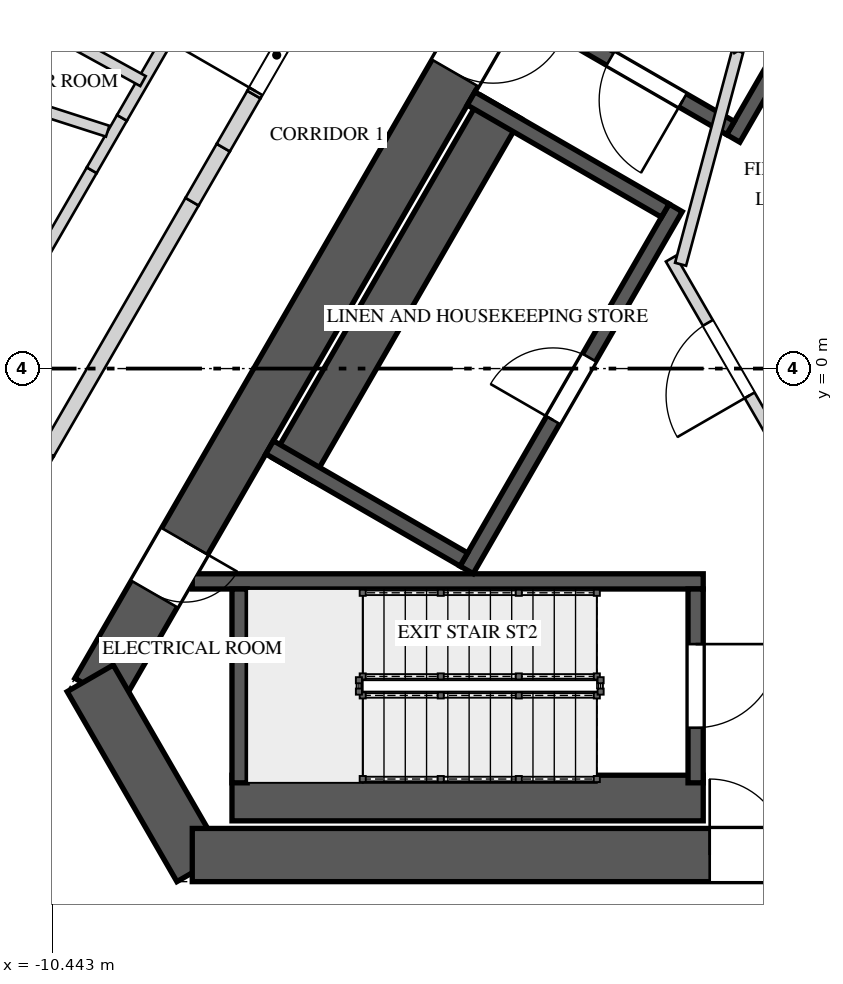
"""IFC4 building model, lengths in metres.
Left out: names, types, materials, properties, quantities, classifications, styles, units other than length and angle.
Written with IfcOpenShell. Run it as: python <this file> out.ifc"""

import sys

from ifc_helpers import new_model, si_unit, direction, frame, frame_2d, origin, place, context, subcontext, project, spatial, polyline, rectangle, outline, extrude, element, fill, save


model = new_model("IFC4")
c1 = context("Model", 3, precision=1e-05, world=origin(), true_north=direction((0.0, 1.0)))
c2 = subcontext(c1, "Body", "Model", "MODEL_VIEW")
j1 = project(units=[si_unit("LENGTHUNIT", "METRE"), si_unit("PLANEANGLEUNIT", "RADIAN")], contexts=[c1])
p1 = place(None, origin())
s1 = spatial("IfcSite", under=j1, at=p1, CompositionType="ELEMENT")
p2 = place(p1, origin())
s2 = spatial("IfcBuilding", under=s1, at=p2, CompositionType="ELEMENT")
p3 = place(p2, frame((0.0, 0.0, 245.2)))
s3 = spatial("IfcBuildingStorey", under=s2, at=p3, CompositionType="ELEMENT", Elevation=245.2)
p4 = place(p3, frame((-1.241, 10.65, 0.0), z_axis=(0.0, 0.0, 1.0), x_axis=(-0.500003331888, -0.866023480109, 0.0)))
e1 = element("IfcWall", 1, at=p4, inside=s3, PredefinedType="SHEAR", context=c2, shape_type="SweptSolid", body=[
    extrude(rectangle(XDim=17.205, YDim=0.7, at=frame_2d((8.603, 0.0))), origin(), (0.0, 0.0, 1.0), 4.0),
])
p5 = place(p4, frame((6.808, 0.0, 0.0)))
e2 = element("IfcOpeningElement", 2, at=p5, cuts=e1, PredefinedType="OPENING", context=c2, shape_type="SweptSolid", body=[
    extrude(rectangle(XDim=1.0, YDim=2.4, at=frame_2d((0.5, 1.2))), frame((0.0, 0.36, 0.0), z_axis=(0.0, -1.0, 0.0), x_axis=(1.0, 0.0, 0.0)), (0.0, 0.0, 1.0), 0.72),
])
p6 = place(p4, frame((14.922, 0.0, 0.0)))
e3 = element("IfcOpeningElement", 3, at=p6, cuts=e1, PredefinedType="OPENING", context=c2, shape_type="SweptSolid", body=[
    extrude(rectangle(XDim=0.8, YDim=2.1, at=frame_2d((0.4, 1.05))), frame((0.0, 0.36, 0.0), z_axis=(0.0, -1.0, 0.0), x_axis=(1.0, 0.0, 0.0)), (0.0, 0.0, 1.0), 0.72),
])
p7 = place(p3, frame((-9.945, -4.075, 0.0), z_axis=(0.0, 0.0, 1.0), x_axis=(0.499995765644, -0.866027848477, 0.0)))
e4 = element("IfcWall", 4, at=p7, inside=s3, PredefinedType="SHEAR", context=c2, shape_type="SweptSolid", body=[
    extrude(rectangle(XDim=2.887, YDim=0.7, at=frame_2d((1.443, 0.0))), origin(), (0.0, 0.0, 1.0), 4.0),
])
p8 = place(p3, frame((-8.603, -6.4, 0.0), z_axis=(0.0, 0.0, 1.0), x_axis=(1.0, 0.0, 0.0)))
e5 = element("IfcWall", 5, at=p8, inside=s3, PredefinedType="SHEAR", context=c2, shape_type="SweptSolid", body=[
    extrude(rectangle(XDim=17.205, YDim=0.7, at=frame_2d((8.603, 0.0))), origin(), (0.0, 0.0, 1.0), 4.0),
])
p9 = place(p8, frame((6.808, 0.0, 0.0)))
e6 = element("IfcOpeningElement", 6, at=p9, cuts=e5, PredefinedType="OPENING", context=c2, shape_type="SweptSolid", body=[
    extrude(rectangle(XDim=1.0, YDim=2.4, at=frame_2d((0.5, 1.2))), frame((0.0, 0.36, 0.0), z_axis=(0.0, -1.0, 0.0), x_axis=(1.0, 0.0, 0.0)), (0.0, 0.0, 1.0), 0.72),
])
p10 = place(p3, frame((1.876, 8.85, 0.0), z_axis=(0.0, 0.0, 1.0), x_axis=(-0.499998042495, -0.866026533947, 0.0)))
e7 = element("IfcWall", 7, at=p10, inside=s3, PredefinedType="SOLIDWALL", context=c2, shape_type="SweptSolid", body=[
    extrude(rectangle(XDim=6.723, YDim=0.2, at=frame_2d((3.361, 0.0))), origin(), (0.0, 0.0, 1.0), 3.65),
])
p11 = place(p3, frame((-1.521, 3.165, 0.0), z_axis=(0.0, 0.0, 1.0), x_axis=(-0.866035871367, 0.499981869177, 0.0)))
e8 = element("IfcWall", 8, at=p11, inside=s3, PredefinedType="SOLIDWALL", context=c2, shape_type="SweptSolid", body=[
    extrude(rectangle(XDim=3.15, YDim=0.2, at=frame_2d((1.575, 0.0))), origin(), (0.0, 0.0, 1.0), 3.65),
])
p12 = place(p11, frame((0.725, 0.0, 0.0)))
e9 = element("IfcOpeningElement", 9, at=p12, cuts=e8, PredefinedType="OPENING", context=c2, shape_type="SweptSolid", body=[
    extrude(rectangle(XDim=1.1, YDim=2.4, at=frame_2d((0.55, 1.2))), frame((0.0, 0.11, 0.0), z_axis=(0.0, -1.0, 0.0), x_axis=(1.0, 0.0, 0.0)), (0.0, 0.0, 1.0), 0.22),
])
p13 = place(p3, frame((-8.08, -5.65, 0.0), z_axis=(0.0, 0.0, 1.0), x_axis=(1.0, 0.0, 0.0)))
e10 = element("IfcWall", 10, at=p13, inside=s3, PredefinedType="SOLIDWALL", context=c2, shape_type="SweptSolid", body=[
    extrude(rectangle(XDim=6.2, YDim=0.6, at=frame_2d((3.1, 0.0))), origin(), (0.0, 0.0, 1.0), 3.65),
])
p14 = place(p3, frame((-8.603, -2.8, 0.0), z_axis=(0.0, 0.0, 1.0), x_axis=(1.0, 0.0, 0.0)))
e11 = element("IfcWall", 11, at=p14, inside=s3, PredefinedType="SOLIDWALL", context=c2, shape_type="SweptSolid", body=[
    extrude(rectangle(XDim=6.723, YDim=0.2, at=frame_2d((3.361, 0.0))), origin(), (0.0, 0.0, 1.0), 3.65),
])
p15 = place(p3, frame((-7.98, -2.9, 0.0), z_axis=(0.0, 0.0, 1.0), x_axis=(0.0, -1.0, 0.0)))
e12 = element("IfcWall", 12, at=p15, inside=s3, PredefinedType="SOLIDWALL", context=c2, shape_type="SweptSolid", body=[
    extrude(rectangle(XDim=2.55, YDim=0.2, at=frame_2d((1.275, 0.0))), origin(), (0.0, 0.0, 1.0), 3.65),
])
p16 = place(p3, frame((-1.98, -2.9, 0.0), z_axis=(0.0, 0.0, 1.0), x_axis=(0.0, -1.0, 0.0)))
e13 = element("IfcWall", 13, at=p16, inside=s3, PredefinedType="SOLIDWALL", context=c2, shape_type="SweptSolid", body=[
    extrude(rectangle(XDim=2.55, YDim=0.2, at=frame_2d((1.275, 0.0))), origin(), (0.0, 0.0, 1.0), 3.65),
])
p17 = place(p16, frame((0.725, 0.0, 0.0)))
e14 = element("IfcOpeningElement", 14, at=p17, cuts=e13, PredefinedType="OPENING", context=c2, shape_type="SweptSolid", body=[
    extrude(rectangle(XDim=1.1, YDim=2.4, at=frame_2d((0.55, 1.2))), frame((0.0, 0.11, 0.0), z_axis=(0.0, -1.0, 0.0), x_axis=(1.0, 0.0, 0.0)), (0.0, 0.0, 1.0), 0.22),
])
p18 = place(p3, frame((-4.993, -2.648, 0.0), z_axis=(0.0, 0.0, 1.0), x_axis=(0.499996545922, 0.866027397988, 0.0)))
e15 = element("IfcWall", 15, at=p18, inside=s3, PredefinedType="SOLIDWALL", context=c2, shape_type="SweptSolid", body=[
    extrude(rectangle(XDim=5.5, YDim=0.2, at=frame_2d((2.75, 0.0))), origin(), (0.0, 0.0, 1.0), 3.65),
])
p19 = place(p18, frame((2.275, 0.0, 0.0)))
e16 = element("IfcOpeningElement", 16, at=p19, cuts=e15, PredefinedType="OPENING", context=c2, shape_type="SweptSolid", body=[
    extrude(rectangle(XDim=0.95, YDim=2.4, at=frame_2d((0.475, 1.2))), frame((0.0, 0.11, 0.0), z_axis=(0.0, -1.0, 0.0), x_axis=(1.0, 0.0, 0.0)), (0.0, 0.0, 1.0), 0.22),
])
p20 = place(p3, frame((-4.538, 3.44, 0.0), z_axis=(0.0, 0.0, 1.0), x_axis=(-0.499996545922, -0.866027397988, 0.0)))
e17 = element("IfcWall", 17, at=p20, inside=s3, PredefinedType="SOLIDWALL", context=c2, shape_type="SweptSolid", body=[
    extrude(rectangle(XDim=5.5, YDim=0.6, at=frame_2d((2.75, 0.0))), origin(), (0.0, 0.0, 1.0), 3.65),
])
for number, where, z_axis, x_axis in (
    (18, (-2.38, 2.078, 0.0), (0.0, 0.0, 1.0), (-0.866, 0.5, 0.0)),
    (19, (-5.03, -2.512, 0.0), (0.0, 0.0, 1.0), (-0.866, 0.5, 0.0)),
):
    element("IfcWall", number, at=place(p3, frame(where, z_axis=z_axis, x_axis=x_axis)), inside=s3, PredefinedType="SOLIDWALL", context=c2, shape_type="SweptSolid", body=[
        extrude(rectangle(XDim=2.95, YDim=0.2, at=frame_2d((1.475, 0.0))), origin(), (0.0, 0.0, 1.0), 3.65),
    ])
p21 = place(p3, frame((-0.744, -1.261, 0.0), z_axis=(0.0, 0.0, 1.0), x_axis=(-0.500004234368, 0.866022959057, 0.0)))
e20 = element("IfcWall", 20, at=p21, inside=s3, PredefinedType="PARTITIONING", context=c2, shape_type="SweptSolid", body=[
    extrude(rectangle(XDim=3.125, YDim=0.15, at=frame_2d((1.562, 0.0))), origin(), (0.0, 0.0, 1.0), 3.65),
])
p22 = place(p21, frame((1.05, 0.0, 0.0)))
e21 = element("IfcOpeningElement", 21, at=p22, cuts=e20, PredefinedType="OPENING", context=c2, shape_type="SweptSolid", body=[
    extrude(rectangle(XDim=1.1, YDim=2.4, at=frame_2d((0.55, 1.2))), frame((0.0, 0.085, 0.0), z_axis=(0.0, -1.0, 0.0), x_axis=(1.0, 0.0, 0.0)), (0.0, 0.0, 1.0), 0.17),
])
p23 = place(p3, frame((-2.178, 1.372, 0.0), z_axis=(0.0, 0.0, 1.0), x_axis=(0.258808958833, 0.96592852884, 0.0)))
e22 = element("IfcWall", 22, at=p23, inside=s3, PredefinedType="PARTITIONING", context=c2, shape_type="SweptSolid", body=[
    extrude(rectangle(XDim=2.903, YDim=0.15, at=frame_2d((1.451, 0.0))), origin(), (0.0, 0.0, 1.0), 3.65),
])
p24 = place(p3, frame((-1.51, 4.215, 0.0), z_axis=(0.0, 0.0, 1.0), x_axis=(0.866085525409, 0.49989585183, 0.0)))
e23 = element("IfcWall", 23, at=p24, inside=s3, PredefinedType="PARTITIONING", context=c2, shape_type="SweptSolid", body=[
    extrude(rectangle(XDim=1.3, YDim=0.15, at=frame_2d((0.65, 0.0))), origin(), (0.0, 0.0, 1.0), 3.65),
])
p25 = place(p3, frame((-12.213, -1.354, 0.0), z_axis=(0.0, 0.0, 1.0), x_axis=(0.500001111708, 0.866024761939, 0.0)))
e24 = element("IfcWall", 24, at=p25, inside=s3, PredefinedType="PARTITIONING", context=c2, shape_type="SweptSolid", body=[
    extrude(rectangle(XDim=4.576, YDim=0.15, at=frame_2d((2.288, 0.0))), origin(), (0.0, 0.0, 1.0), 3.65),
])
p26 = place(p25, frame((0.445, 0.0, 0.0)))
e25 = element("IfcOpeningElement", 25, at=p26, cuts=e24, PredefinedType="OPENING", context=c2, shape_type="SweptSolid", body=[
    extrude(rectangle(XDim=0.95, YDim=2.4, at=frame_2d((0.475, 1.2))), frame((0.0, 0.085, 0.0), z_axis=(0.0, -1.0, 0.0), x_axis=(1.0, 0.0, 0.0)), (0.0, 0.0, 1.0), 0.17),
])
p27 = place(p3, frame((-9.925, 2.609, 0.0), z_axis=(0.0, 0.0, 1.0), x_axis=(0.499802134818, 0.866139611167, 0.0)))
e26 = element("IfcWall", 26, at=p27, inside=s3, PredefinedType="PARTITIONING", context=c2, shape_type="SweptSolid", body=[
    extrude(rectangle(XDim=0.796, YDim=0.15, at=frame_2d((0.398, 0.0))), origin(), (0.0, 0.0, 1.0), 2.75),
])
p28 = place(p3, frame((-9.527, 3.298, 0.0), z_axis=(0.0, 0.0, 1.0), x_axis=(0.500094991843, 0.865970553272, 0.0)))
e27 = element("IfcWall", 27, at=p28, inside=s3, PredefinedType="PARTITIONING", context=c2, shape_type="SweptSolid", body=[
    extrude(rectangle(XDim=1.626, YDim=0.15, at=frame_2d((0.813, 0.0))), origin(), (0.0, 0.0, 1.0), 3.65),
])
p29 = place(p3, frame((-9.715, 3.123, 0.0), z_axis=(0.0, 0.0, 1.0), x_axis=(-0.952031844805, 0.305998964831, 0.0)))
e28 = element("IfcWall", 28, at=p29, inside=s3, PredefinedType="PARTITIONING", context=c2, shape_type="SweptSolid", body=[
    extrude(rectangle(XDim=10.057, YDim=0.15, at=frame_2d((5.028, 0.0))), origin(), (0.0, 0.0, 1.0), 2.75),
])
p30 = place(p3, frame((-9.25, 3.782, 0.0), z_axis=(0.0, 0.0, 1.0), x_axis=(-0.876043224435, 0.482232587991, 0.0)))
e29 = element("IfcWall", 29, at=p30, inside=s3, PredefinedType="PARTITIONING", context=c2, shape_type="SweptSolid", body=[
    extrude(rectangle(XDim=2.896, YDim=0.15, at=frame_2d((1.448, 0.0))), origin(), (0.0, 0.0, 1.0), 3.65),
])
p31 = place(p30, frame((1.62, 0.0, 0.0)))
e30 = element("IfcOpeningElement", 30, at=p31, cuts=e29, PredefinedType="OPENING", context=c2, shape_type="SweptSolid", body=[
    extrude(rectangle(XDim=0.85, YDim=2.4, at=frame_2d((0.425, 1.2))), frame((0.0, 0.085, 0.0), z_axis=(0.0, -1.0, 0.0), x_axis=(1.0, 0.0, 0.0)), (0.0, 0.0, 1.0), 0.17),
])
p32 = place(p3, frame((-10.123, -8.067, 0.0), z_axis=(0.0, 0.0, 1.0), x_axis=(-0.500005339912, 0.866022320763, 0.0)))
e31 = element("IfcWall", 31, at=p32, inside=s3, PredefinedType="SOLIDWALL", context=c2, shape_type="SweptSolid", body=[
    extrude(rectangle(XDim=4.408, YDim=0.2, at=frame_2d((2.204, 0.0))), origin(), (0.0, 0.0, 1.0), 3.65),
])
p33 = place(p3, frame((-10.954, -1.873, 0.0), z_axis=(0.0, 0.0, 1.0), x_axis=(0.500016243463, 0.866016025414, 0.0)))
e32 = element("IfcWall", 32, at=p33, inside=s3, PredefinedType="SOLIDWALL", context=c2, shape_type="SweptSolid", body=[
    extrude(rectangle(XDim=0.887, YDim=0.2, at=frame_2d((0.444, 0.0))), origin(), (0.0, 0.0, 1.0), 2.95),
])
p34 = place(p3, frame((-10.51, -1.105, 0.0), z_axis=(0.0, 0.0, 1.0), x_axis=(0.499997905474, 0.866026613056, 0.0)))
e33 = element("IfcWall", 33, at=p34, inside=s3, PredefinedType="SOLIDWALL", context=c2, shape_type="SweptSolid", body=[
    extrude(rectangle(XDim=3.811, YDim=0.2, at=frame_2d((1.905, 0.0))), origin(), (0.0, 0.0, 1.0), 3.65),
])
p35 = place(p3, frame((-8.605, 2.195, 0.0), z_axis=(0.0, 0.0, 1.0), x_axis=(0.499911126926, 0.866076708598, 0.0)))
e34 = element("IfcWall", 34, at=p35, inside=s3, PredefinedType="SOLIDWALL", context=c2, shape_type="SweptSolid", body=[
    extrude(rectangle(XDim=0.822, YDim=0.2, at=frame_2d((0.411, 0.0))), origin(), (0.0, 0.0, 1.0), 2.75),
])
p36 = place(p3, frame((-8.195, 2.907, 0.0), z_axis=(0.0, 0.0, 1.0), x_axis=(0.500211976125, 0.865902984716, 0.0)))
e35 = element("IfcWall", 35, at=p36, inside=s3, PredefinedType="SOLIDWALL", context=c2, shape_type="SweptSolid", body=[
    extrude(rectangle(XDim=0.806, YDim=0.2, at=frame_2d((0.403, 0.0))), origin(), (0.0, 0.0, 1.0), 3.65),
])
p37 = place(p3, frame((-7.792, 3.604, 0.0), z_axis=(0.0, 0.0, 1.0), x_axis=(0.500002290144, 0.866024081565, 0.0)))
e36 = element("IfcWall", 36, at=p37, inside=s3, PredefinedType="SOLIDWALL", context=c2, shape_type="SweptSolid", body=[
    extrude(outline(polyline([(0.0, 0.0), (1.359, 0.0), (1.359, 2.55), (0.459, 2.55), (0.459, 3.65), (0.0, 3.65), (0.0, 0.0)])), frame((0.0, 0.1, 0.0), z_axis=(0.0, -1.0, 0.0), x_axis=(1.0, 0.0, 0.0)), (0.0, 0.0, 1.0), 0.2),
])
p38 = place(p37, frame((0.05, 0.0, 0.0)))
e37 = element("IfcOpeningElement", 37, at=p38, cuts=e36, PredefinedType="OPENING", context=c2, shape_type="SweptSolid", body=[
    extrude(rectangle(XDim=1.1, YDim=2.4, at=frame_2d((0.55, 1.2))), frame((0.0, 0.11, 0.0), z_axis=(0.0, -1.0, 0.0), x_axis=(1.0, 0.0, 0.0)), (0.0, 0.0, 1.0), 0.22),
])
p39 = place(p12, origin())
e38 = element("IfcDoor", 38, at=p39, inside=s3, OperationType="SINGLE_SWING_RIGHT", PredefinedType="DOOR", context=c2, shape_type="SweptSolid", body=[
    extrude(rectangle(XDim=1.1, YDim=2.4, at=frame_2d((0.55, 1.2))), frame((0.0, 0.025, 0.0), z_axis=(0.0, -1.0, 0.0), x_axis=(1.0, 0.0, 0.0)), (0.0, 0.0, 1.0), 0.05),
])
fill(e9, e38)
p40 = place(p17, origin())
e39 = element("IfcDoor", 39, at=p40, inside=s3, OperationType="SINGLE_SWING_LEFT", PredefinedType="DOOR", context=c2, shape_type="SweptSolid", body=[
    extrude(rectangle(XDim=1.1, YDim=2.4, at=frame_2d((0.55, 1.2))), frame((0.0, 0.025, 0.0), z_axis=(0.0, -1.0, 0.0), x_axis=(1.0, 0.0, 0.0)), (0.0, 0.0, 1.0), 0.05),
])
fill(e14, e39)
p41 = place(p19, origin())
e40 = element("IfcDoor", 40, at=p41, inside=s3, OperationType="SINGLE_SWING_LEFT", PredefinedType="DOOR", context=c2, shape_type="SweptSolid", body=[
    extrude(rectangle(XDim=0.95, YDim=2.4, at=frame_2d((0.475, 1.2))), frame((0.0, 0.025, 0.0), z_axis=(0.0, -1.0, 0.0), x_axis=(1.0, 0.0, 0.0)), (0.0, 0.0, 1.0), 0.05),
])
fill(e16, e40)
p42 = place(p22, origin())
e41 = element("IfcDoor", 41, at=p42, inside=s3, OperationType="SINGLE_SWING_RIGHT", PredefinedType="DOOR", context=c2, shape_type="SweptSolid", body=[
    extrude(rectangle(XDim=1.1, YDim=2.4, at=frame_2d((0.55, 1.2))), frame((0.0, 0.025, 0.0), z_axis=(0.0, -1.0, 0.0), x_axis=(1.0, 0.0, 0.0)), (0.0, 0.0, 1.0), 0.05),
])
fill(e21, e41)
p43 = place(p5, origin())
e42 = element("IfcDoor", 42, at=p43, inside=s3, OperationType="SINGLE_SWING_LEFT", PredefinedType="DOOR", context=c2, shape_type="SweptSolid", body=[
    extrude(rectangle(XDim=1.0, YDim=2.4, at=frame_2d((0.5, 1.2))), frame((0.0, 0.025, 0.0), z_axis=(0.0, -1.0, 0.0), x_axis=(1.0, 0.0, 0.0)), (0.0, 0.0, 1.0), 0.05),
])
fill(e2, e42)
p44 = place(p9, origin())
e43 = element("IfcDoor", 43, at=p44, inside=s3, OperationType="SINGLE_SWING_RIGHT", PredefinedType="DOOR", context=c2, shape_type="SweptSolid", body=[
    extrude(rectangle(XDim=1.0, YDim=2.4, at=frame_2d((0.5, 1.2))), frame((0.0, 0.025, 0.0), z_axis=(0.0, -1.0, 0.0), x_axis=(1.0, 0.0, 0.0)), (0.0, 0.0, 1.0), 0.05),
])
fill(e6, e43)
p45 = place(p6, origin())
e44 = element("IfcDoor", 44, at=p45, inside=s3, OperationType="SINGLE_SWING_RIGHT", PredefinedType="DOOR", context=c2, shape_type="SweptSolid", body=[
    extrude(rectangle(XDim=0.8, YDim=2.1, at=frame_2d((0.4, 1.05))), frame((0.0, 0.025, 0.0), z_axis=(0.0, -1.0, 0.0), x_axis=(1.0, 0.0, 0.0)), (0.0, 0.0, 1.0), 0.05),
])
fill(e3, e44)
p46 = place(p38, origin())
e45 = element("IfcDoor", 45, at=p46, inside=s3, OperationType="SINGLE_SWING_LEFT", PredefinedType="DOOR", context=c2, shape_type="SweptSolid", body=[
    extrude(rectangle(XDim=1.1, YDim=2.4, at=frame_2d((0.55, 1.2))), frame((0.0, 0.025, 0.0), z_axis=(0.0, -1.0, 0.0), x_axis=(1.0, 0.0, 0.0)), (0.0, 0.0, 1.0), 0.05),
])
fill(e37, e45)
save(model, sys.argv[1])
